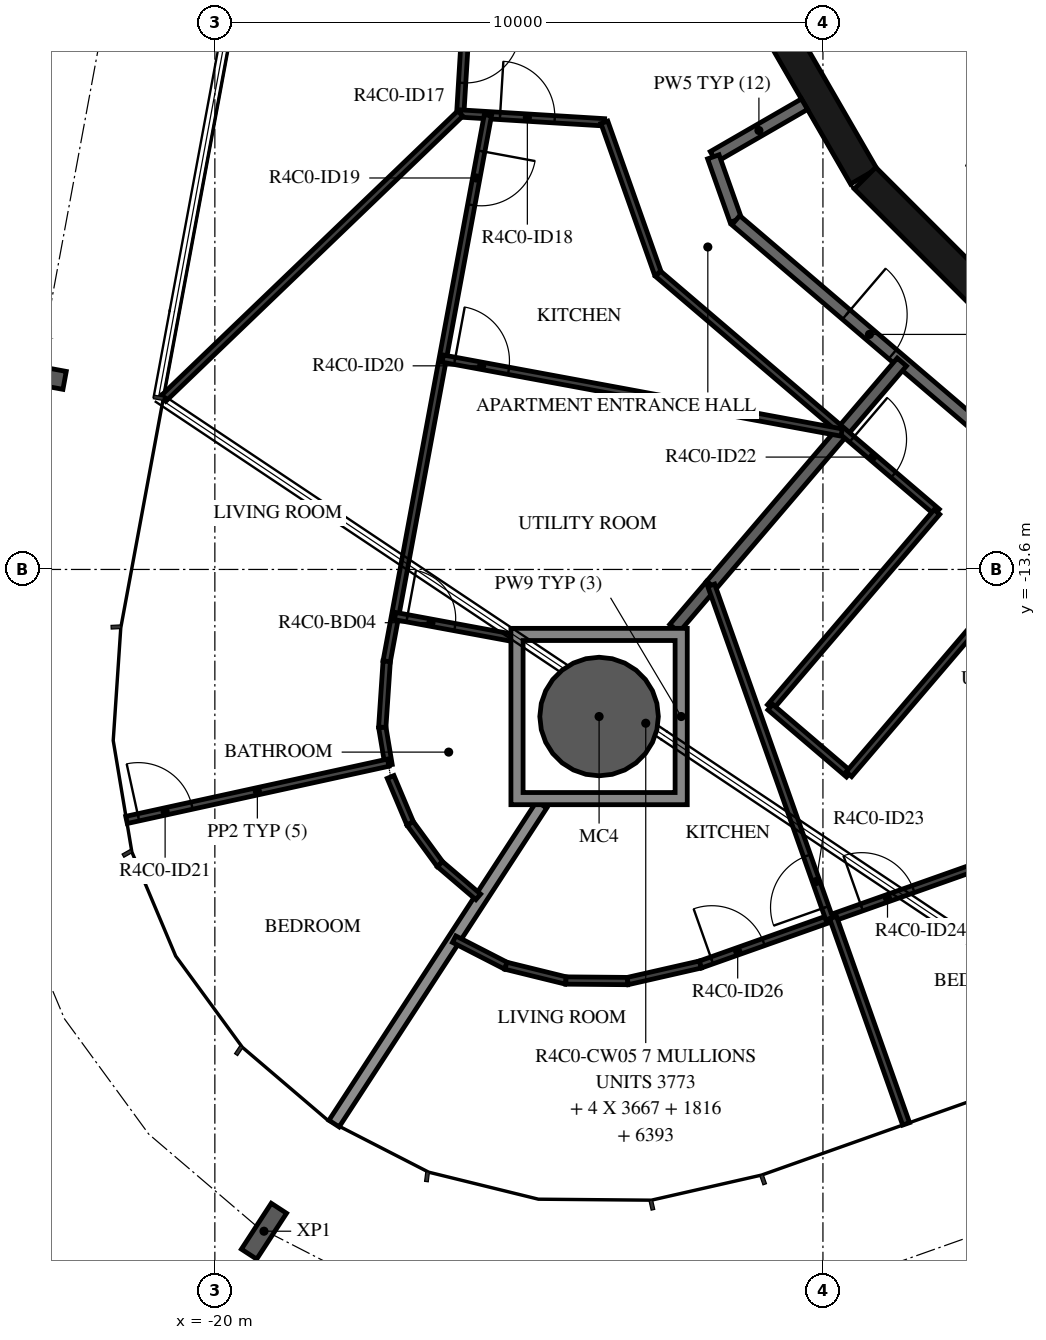
"""IFC4 building model, lengths in metres.
Left out: names, types, materials, properties, quantities, classifications, styles, units other than length and angle.
Written with IfcOpenShell. Run it as: python <this file> out.ifc"""

import sys

from ifc_helpers import new_model, si_unit, direction, frame, frame_2d, origin, origin_2d, place, context, subcontext, project, spatial, polyline, rectangle, hollow_circle, i_section, outline, extrude, element, fill, save


model = new_model("IFC4")
c1 = context("Model", 3, precision=1e-05, world=origin(), true_north=direction((0.0, 1.0)))
c2 = subcontext(c1, "Body", "Model", "MODEL_VIEW")
j1 = project(units=[si_unit("LENGTHUNIT", "METRE"), si_unit("PLANEANGLEUNIT", "RADIAN")], contexts=[c1])
p1 = place(None, origin())
s1 = spatial("IfcSite", under=j1, at=p1, CompositionType="ELEMENT")
p2 = place(p1, origin())
s2 = spatial("IfcBuilding", under=s1, at=p2, CompositionType="ELEMENT")
p3 = place(p2, frame((0.0, 0.0, 172.7)))
s3 = spatial("IfcBuildingStorey", under=s2, at=p3, CompositionType="ELEMENT", Elevation=172.7)
p4 = place(p3, frame((-13.681, -16.019, -0.38), z_axis=(0.0, 0.0, 1.0), x_axis=(1.0, 0.0, 0.0)))
e1 = element("IfcColumn", 1, at=p4, inside=s3, PredefinedType="COLUMN", context=c2, shape_type="SweptSolid", body=[
    extrude(hollow_circle(Radius=0.975, WallThickness=0.045, at=origin_2d()), origin(), (0.0, 0.0, 1.0), 3.5),
])
for number, where, z_axis, x_axis in (
    (2, (-22.914, -10.409, -0.38), (0.0, 0.0, 1.0), (0.182, 0.983, 0.0)),
    (3, (-19.192, -24.483, -0.38), (0.0, 0.0, 1.0), (-0.838, 0.546, 0.0)),
):
    element("IfcColumn", number, at=place(p3, frame(where, z_axis=z_axis, x_axis=x_axis)), inside=s3, PredefinedType="COLUMN", context=c2, shape_type="SweptSolid", body=[
        extrude(i_section(OverallWidth=0.3, OverallDepth=0.9, WebThickness=0.019, FlangeThickness=0.035, FilletRadius=0.03, at=origin_2d()), origin(), (0.0, 0.0, 1.0), 3.5),
    ])
p5 = place(p3, frame((-10.845, -4.51, 0.0), z_axis=(0.0, 0.0, 1.0), x_axis=(0.500087131594, -0.865975092491, 0.0)))
e4 = element("IfcWall", 4, at=p5, inside=s3, PredefinedType="SHEAR", context=c2, shape_type="SweptSolid", body=[
    extrude(rectangle(XDim=3.033, YDim=0.5, at=frame_2d((1.516, 0.0))), origin(), (0.0, 0.0, 1.0), 3.12),
])
p6 = place(p3, frame((-9.308, -7.164, 0.0), z_axis=(0.0, 0.0, 1.0), x_axis=(0.707106781187, -0.707106781187, 0.0)))
e5 = element("IfcWall", 5, at=p6, inside=s3, PredefinedType="SHEAR", context=c2, shape_type="SweptSolid", body=[
    extrude(rectangle(XDim=3.032, YDim=0.5, at=frame_2d((1.516, 0.0))), origin(), (0.0, 0.0, 1.0), 3.12),
])
p7 = place(p3, frame((-10.303, -5.949, 0.0), z_axis=(0.0, 0.0, 1.0), x_axis=(-0.866021168401, -0.500007335828, 0.0)))
e6 = element("IfcWall", 6, at=p7, inside=s3, PredefinedType="STANDARD", context=c2, shape_type="SweptSolid", body=[
    extrude(rectangle(XDim=1.731, YDim=0.2, at=frame_2d((0.865, 0.0))), origin(), (0.0, 0.0, 1.0), 3.12),
])
p8 = place(p3, frame((-11.802, -6.814, 0.0), z_axis=(0.0, 0.0, 1.0), x_axis=(0.333904297771, -0.942606980629, 0.0)))
e7 = element("IfcWall", 7, at=p8, inside=s3, PredefinedType="STANDARD", context=c2, shape_type="SweptSolid", body=[
    extrude(rectangle(XDim=1.107, YDim=0.2, at=frame_2d((0.553, 0.0))), origin(), (0.0, 0.0, 1.0), 3.12),
])
p9 = place(p3, frame((-11.433, -7.858, 0.0), z_axis=(0.0, 0.0, 1.0), x_axis=(0.760412154545, -0.649440801937, 0.0)))
e8 = element("IfcWall", 8, at=p9, inside=s3, PredefinedType="STANDARD", context=c2, shape_type="SweptSolid", body=[
    extrude(rectangle(XDim=7.181, YDim=0.2, at=frame_2d((3.59, 0.0))), origin(), (0.0, 0.0, 1.0), 3.12),
])
p10 = place(p9, frame((2.39, 0.0, 0.0)))
e9 = element("IfcOpeningElement", 9, at=p10, cuts=e8, PredefinedType="OPENING", context=c2, shape_type="SweptSolid", body=[
    extrude(rectangle(XDim=1.0, YDim=2.1, at=frame_2d((0.5, 1.05))), frame((0.0, 0.11, 0.0), z_axis=(0.0, -1.0, 0.0), x_axis=(1.0, 0.0, 0.0)), (0.0, 0.0, 1.0), 0.22),
])
p11 = place(p3, frame((-11.838, -13.86, 0.0), z_axis=(0.0, 0.0, 1.0), x_axis=(0.64944503311, 0.760408540831, 0.0)))
e10 = element("IfcWall", 10, at=p11, inside=s3, PredefinedType="STANDARD", context=c2, shape_type="SweptSolid", body=[
    extrude(rectangle(XDim=4.827, YDim=0.2, at=frame_2d((2.414, 0.0))), origin(), (0.0, 0.0, 1.0), 3.12),
])
p12 = place(p3, frame((-12.443, -14.569, 0.0), z_axis=(0.0, 0.0, 1.0), x_axis=(0.649517408851, 0.760346720648, 0.0)))
e11 = element("IfcWall", 11, at=p12, inside=s3, PredefinedType="STANDARD", context=c2, shape_type="SweptSolid", body=[
    extrude(rectangle(XDim=0.932, YDim=0.2, at=frame_2d((0.466, 0.0))), origin(), (0.0, 0.0, 1.0), 3.12),
])
p13 = place(p3, frame((-18.04, -22.713, 0.0), z_axis=(0.0, 0.0, 1.0), x_axis=(0.545628572271, 0.838027124335, 0.0)))
e12 = element("IfcWall", 12, at=p13, inside=s3, PredefinedType="STANDARD", context=c2, shape_type="SweptSolid", body=[
    extrude(rectangle(XDim=6.258, YDim=0.2, at=frame_2d((3.129, 0.0))), origin(), (0.0, 0.0, 1.0), 2.73),
])
p14 = place(p3, frame((-15.866, -4.5, 0.0), z_axis=(0.0, 0.0, 1.0), x_axis=(-0.060986374837, -0.998138598635, 0.0)))
e13 = element("IfcWall", 13, at=p14, inside=s3, PredefinedType="PARTITIONING", context=c2, shape_type="SweptSolid", body=[
    extrude(rectangle(XDim=1.605, YDim=0.12, at=frame_2d((0.803, 0.0))), origin(), (0.0, 0.0, 1.0), 3.12),
])
p15 = place(p14, frame((0.2, 0.0, 0.0)))
e14 = element("IfcOpeningElement", 14, at=p15, cuts=e13, PredefinedType="OPENING", context=c2, shape_type="SweptSolid", body=[
    extrude(rectangle(XDim=0.9, YDim=2.1, at=frame_2d((0.45, 1.05))), frame((0.0, 0.07, 0.0), z_axis=(0.0, -1.0, 0.0), x_axis=(1.0, 0.0, 0.0)), (0.0, 0.0, 1.0), 0.14),
])
p16 = place(p3, frame((-15.964, -6.102, 0.0), z_axis=(0.0, 0.0, 1.0), x_axis=(0.998145469708, -0.060873814574, 0.0)))
e15 = element("IfcWall", 15, at=p16, inside=s3, PredefinedType="PARTITIONING", context=c2, shape_type="SweptSolid", body=[
    extrude(rectangle(XDim=2.374, YDim=0.12, at=frame_2d((1.187, 0.0))), origin(), (0.0, 0.0, 1.0), 3.12),
])
p17 = place(p16, frame((0.656, 0.0, 0.0)))
e16 = element("IfcOpeningElement", 16, at=p17, cuts=e15, PredefinedType="OPENING", context=c2, shape_type="SweptSolid", body=[
    extrude(rectangle(XDim=0.9, YDim=2.1, at=frame_2d((0.45, 1.05))), frame((0.0, 0.07, 0.0), z_axis=(0.0, -1.0, 0.0), x_axis=(1.0, 0.0, 0.0)), (0.0, 0.0, 1.0), 0.14),
])
p18 = place(p3, frame((-13.594, -6.247, 0.0), z_axis=(0.0, 0.0, 1.0), x_axis=(0.333777006894, -0.942652061828, 0.0)))
e17 = element("IfcWall", 17, at=p18, inside=s3, PredefinedType="PARTITIONING", context=c2, shape_type="SweptSolid", body=[
    extrude(rectangle(XDim=2.642, YDim=0.12, at=frame_2d((1.321, 0.0))), origin(), (0.0, 0.0, 1.0), 3.12),
])
p19 = place(p3, frame((-12.713, -8.737, 0.0), z_axis=(0.0, 0.0, 1.0), x_axis=(0.760432387723, -0.649417110725, 0.0)))
e18 = element("IfcWall", 18, at=p19, inside=s3, PredefinedType="PARTITIONING", context=c2, shape_type="SweptSolid", body=[
    extrude(rectangle(XDim=6.032, YDim=0.12, at=frame_2d((3.016, 0.0))), origin(), (0.0, 0.0, 1.0), 3.12),
])
p20 = place(p19, frame((4.192, 0.0, 0.0)))
e19 = element("IfcOpeningElement", 19, at=p20, cuts=e18, PredefinedType="OPENING", context=c2, shape_type="SweptSolid", body=[
    extrude(rectangle(XDim=0.9, YDim=2.1, at=frame_2d((0.45, 1.05))), frame((0.0, 0.07, 0.0), z_axis=(0.0, -1.0, 0.0), x_axis=(1.0, 0.0, 0.0)), (0.0, 0.0, 1.0), 0.14),
])
p21 = place(p3, frame((-20.849, -10.792, 0.0), z_axis=(0.0, 0.0, 1.0), x_axis=(0.721364983662, 0.692555095531, 0.0)))
e20 = element("IfcWall", 20, at=p21, inside=s3, PredefinedType="PARTITIONING", context=c2, shape_type="SweptSolid", body=[
    extrude(rectangle(XDim=6.771, YDim=0.12, at=frame_2d((3.385, 0.0))), origin(), (0.0, 0.0, 1.0), 3.12),
])
p22 = place(p3, frame((-15.51, -6.13, 0.0), z_axis=(0.0, 0.0, 1.0), x_axis=(-0.182243361628, -0.98325345519, 0.0)))
e21 = element("IfcWall", 21, at=p22, inside=s3, PredefinedType="PARTITIONING", context=c2, shape_type="SweptSolid", body=[
    extrude(rectangle(XDim=9.134, YDim=0.12, at=frame_2d((4.567, 0.0))), origin(), (0.0, 0.0, 1.0), 3.12),
])
p23 = place(p22, frame((0.6, 0.0, 0.0)))
e22 = element("IfcOpeningElement", 22, at=p23, cuts=e21, PredefinedType="OPENING", context=c2, shape_type="SweptSolid", body=[
    extrude(rectangle(XDim=0.9, YDim=2.1, at=frame_2d((0.45, 1.05))), frame((0.0, 0.07, 0.0), z_axis=(0.0, -1.0, 0.0), x_axis=(1.0, 0.0, 0.0)), (0.0, 0.0, 1.0), 0.14),
])
p24 = place(p3, frame((-16.252, -10.133, 0.0), z_axis=(0.0, 0.0, 1.0), x_axis=(0.983256998026, -0.182224246005, 0.0)))
e23 = element("IfcWall", 23, at=p24, inside=s3, PredefinedType="PARTITIONING", context=c2, shape_type="SweptSolid", body=[
    extrude(rectangle(XDim=6.671, YDim=0.12, at=frame_2d((3.335, 0.0))), origin(), (0.0, 0.0, 1.0), 3.12),
])
p25 = place(p24, frame((0.2, 0.0, 0.0)))
e24 = element("IfcOpeningElement", 24, at=p25, cuts=e23, PredefinedType="OPENING", context=c2, shape_type="SweptSolid", body=[
    extrude(rectangle(XDim=0.9, YDim=2.1, at=frame_2d((0.45, 1.05))), frame((0.0, 0.07, 0.0), z_axis=(0.0, -1.0, 0.0), x_axis=(1.0, 0.0, 0.0)), (0.0, 0.0, 1.0), 0.14),
])
p26 = place(p3, frame((-17.143, -16.817, 0.0), z_axis=(0.0, 0.0, 1.0), x_axis=(-0.164964120994, 0.98629956848, 0.0)))
e25 = element("IfcWall", 25, at=p26, inside=s3, PredefinedType="PARTITIONING", context=c2, shape_type="SweptSolid", body=[
    extrude(rectangle(XDim=0.63, YDim=0.12, at=frame_2d((0.315, 0.0))), origin(), (0.0, 0.0, 1.0), 3.12),
])
p27 = place(p3, frame((-17.247, -16.195, 0.0), z_axis=(0.0, 0.0, 1.0), x_axis=(0.066712820538, 0.997772218282, 0.0)))
e26 = element("IfcWall", 26, at=p27, inside=s3, PredefinedType="PARTITIONING", context=c2, shape_type="SweptSolid", body=[
    extrude(rectangle(XDim=1.087, YDim=0.12, at=frame_2d((0.543, 0.0))), origin(), (0.0, 0.0, 1.0), 3.12),
])
p28 = place(p3, frame((-21.453, -17.719, 0.0), z_axis=(0.0, 0.0, 1.0), x_axis=(0.976887361549, 0.213754725903, 0.0)))
e27 = element("IfcWall", 27, at=p28, inside=s3, PredefinedType="PARTITIONING", context=c2, shape_type="SweptSolid", body=[
    extrude(rectangle(XDim=4.405, YDim=0.12, at=frame_2d((2.203, 0.0))), origin(), (0.0, 0.0, 1.0), 2.73),
])
p29 = place(p28, frame((0.2, 0.0, 0.0)))
e28 = element("IfcOpeningElement", 28, at=p29, cuts=e27, PredefinedType="OPENING", context=c2, shape_type="SweptSolid", body=[
    extrude(rectangle(XDim=0.9, YDim=2.1, at=frame_2d((0.45, 1.05))), frame((0.0, 0.07, 0.0), z_axis=(0.0, -1.0, 0.0), x_axis=(1.0, 0.0, 0.0)), (0.0, 0.0, 1.0), 0.14),
])
p30 = place(p3, frame((-17.036, -14.366, 0.0), z_axis=(0.0, 0.0, 1.0), x_axis=(0.983259435886, -0.182211091156, 0.0)))
e29 = element("IfcWall", 29, at=p30, inside=s3, PredefinedType="PARTITIONING", context=c2, shape_type="SweptSolid", body=[
    extrude(rectangle(XDim=1.938, YDim=0.12, at=frame_2d((0.969, 0.0))), origin(), (0.0, 0.0, 1.0), 3.12),
])
p31 = place(p30, frame((0.2, 0.0, 0.0)))
e30 = element("IfcOpeningElement", 30, at=p31, cuts=e29, PredefinedType="OPENING", context=c2, shape_type="SweptSolid", body=[
    extrude(rectangle(XDim=0.8, YDim=2.1, at=frame_2d((0.4, 1.05))), frame((0.0, 0.07, 0.0), z_axis=(0.0, -1.0, 0.0), x_axis=(1.0, 0.0, 0.0)), (0.0, 0.0, 1.0), 0.14),
])
for number, where, z_axis, x_axis in (
    (31, (-17.11, -17.013, 0.0), (0.0, 0.0, 1.0), (0.388, -0.922, 0.0)),
    (32, (-16.788, -17.777, 0.0), (0.0, 0.0, 1.0), (0.59, -0.807, 0.0)),
    (33, (-16.299, -18.446, 0.0), (0.0, 0.0, 1.0), (0.76, -0.649, 0.0)),
):
    element("IfcWall", number, at=place(p3, frame(where, z_axis=z_axis, x_axis=x_axis)), inside=s3, PredefinedType="PARTITIONING", context=c2, shape_type="SweptSolid", body=[
        extrude(rectangle(XDim=0.829, YDim=0.12, at=frame_2d((0.415, 0.0))), origin(), (0.0, 0.0, 1.0), 3.12),
    ])
p32 = place(p3, frame((-8.125, -12.655, 0.0), z_axis=(0.0, 0.0, 1.0), x_axis=(-0.649441944702, -0.760411178549, 0.0)))
e34 = element("IfcWall", 34, at=p32, inside=s3, PredefinedType="PARTITIONING", context=c2, shape_type="SweptSolid", body=[
    extrude(rectangle(XDim=4.22, YDim=0.12, at=frame_2d((2.11, 0.0))), origin(), (0.0, 0.0, 1.0), 3.12),
])
p33 = place(p3, frame((-10.866, -15.864, 0.0), z_axis=(0.0, 0.0, 1.0), x_axis=(0.760431300628, -0.649418383652, 0.0)))
e35 = element("IfcWall", 35, at=p33, inside=s3, PredefinedType="PARTITIONING", context=c2, shape_type="SweptSolid", body=[
    extrude(rectangle(XDim=1.7, YDim=0.12, at=frame_2d((0.85, 0.0))), origin(), (0.0, 0.0, 1.0), 3.12),
])
p34 = place(p3, frame((-9.573, -16.968, 0.0), z_axis=(0.0, 0.0, 1.0), x_axis=(0.649437062208, 0.760415348498, 0.0)))
e36 = element("IfcWall", 36, at=p34, inside=s3, PredefinedType="PARTITIONING", context=c2, shape_type="SweptSolid", body=[
    extrude(rectangle(XDim=4.219, YDim=0.12, at=frame_2d((2.11, 0.0))), origin(), (0.0, 0.0, 1.0), 3.12),
])
p35 = place(p3, frame((-16.065, -19.68, 0.0), z_axis=(0.0, 0.0, 1.0), x_axis=(0.889684645268, -0.456575549033, 0.0)))
e37 = element("IfcWall", 37, at=p35, inside=s3, PredefinedType="PARTITIONING", context=c2, shape_type="SweptSolid", body=[
    extrude(rectangle(XDim=0.957, YDim=0.12, at=frame_2d((0.479, 0.0))), origin(), (0.0, 0.0, 1.0), 3.12),
])
p36 = place(p3, frame((-15.214, -20.117, 0.0), z_axis=(0.0, 0.0, 1.0), x_axis=(0.970998575146, -0.239085271534, 0.0)))
e38 = element("IfcWall", 38, at=p36, inside=s3, PredefinedType="PARTITIONING", context=c2, shape_type="SweptSolid", body=[
    extrude(rectangle(XDim=1.016, YDim=0.12, at=frame_2d((0.508, 0.0))), origin(), (0.0, 0.0, 1.0), 3.12),
])
p37 = place(p3, frame((-14.227, -20.36, 0.0), z_axis=(0.0, 0.0, 1.0), x_axis=(0.999960467683, -0.008891741722, 0.0)))
e39 = element("IfcWall", 39, at=p37, inside=s3, PredefinedType="PARTITIONING", context=c2, shape_type="SweptSolid", body=[
    extrude(rectangle(XDim=1.016, YDim=0.12, at=frame_2d((0.508, 0.0))), origin(), (0.0, 0.0, 1.0), 3.12),
])
p38 = place(p3, frame((-13.211, -20.369, 0.0), z_axis=(0.0, 0.0, 1.0), x_axis=(0.974997834831, 0.222214360642, 0.0)))
e40 = element("IfcWall", 40, at=p38, inside=s3, PredefinedType="PARTITIONING", context=c2, shape_type="SweptSolid", body=[
    extrude(rectangle(XDim=1.227, YDim=0.12, at=frame_2d((0.614, 0.0))), origin(), (0.0, 0.0, 1.0), 3.12),
])
p39 = place(p3, frame((-12.015, -20.096, 0.0), z_axis=(0.0, 0.0, 1.0), x_axis=(0.942638913957, 0.33381413675, 0.0)))
e41 = element("IfcWall", 41, at=p39, inside=s3, PredefinedType="PARTITIONING", context=c2, shape_type="SweptSolid", body=[
    extrude(rectangle(XDim=14.104, YDim=0.12, at=frame_2d((7.052, 0.0))), origin(), (0.0, 0.0, 1.0), 3.12),
])
p40 = place(p39, frame((2.814, 0.0, 0.0)))
e42 = element("IfcOpeningElement", 42, at=p40, cuts=e41, PredefinedType="OPENING", context=c2, shape_type="SweptSolid", body=[
    extrude(rectangle(XDim=0.9, YDim=2.1, at=frame_2d((0.45, 1.05))), frame((0.0, 0.07, 0.0), z_axis=(0.0, -1.0, 0.0), x_axis=(1.0, 0.0, 0.0)), (0.0, 0.0, 1.0), 0.14),
])
p41 = place(p39, frame((6.444, 0.0, 0.0)))
e43 = element("IfcOpeningElement", 43, at=p41, cuts=e41, PredefinedType="OPENING", context=c2, shape_type="SweptSolid", body=[
    extrude(rectangle(XDim=0.9, YDim=2.1, at=frame_2d((0.45, 1.05))), frame((0.0, 0.07, 0.0), z_axis=(0.0, -1.0, 0.0), x_axis=(1.0, 0.0, 0.0)), (0.0, 0.0, 1.0), 0.14),
])
p42 = place(p39, frame((0.2, 0.0, 0.0)))
e44 = element("IfcOpeningElement", 44, at=p42, cuts=e41, PredefinedType="OPENING", context=c2, shape_type="SweptSolid", body=[
    extrude(rectangle(XDim=0.9, YDim=2.1, at=frame_2d((0.45, 1.05))), frame((0.0, 0.07, 0.0), z_axis=(0.0, -1.0, 0.0), x_axis=(1.0, 0.0, 0.0)), (0.0, 0.0, 1.0), 0.14),
])
p43 = place(p3, frame((-9.895, -19.346, 0.0), z_axis=(0.0, 0.0, 1.0), x_axis=(-0.333781129158, 0.942650602195, 0.0)))
e45 = element("IfcWall", 45, at=p43, inside=s3, PredefinedType="PARTITIONING", context=c2, shape_type="SweptSolid", body=[
    extrude(rectangle(XDim=5.819, YDim=0.12, at=frame_2d((2.91, 0.0))), origin(), (0.0, 0.0, 1.0), 3.12),
])
p44 = place(p43, frame((0.2, 0.0, 0.0)))
e46 = element("IfcOpeningElement", 46, at=p44, cuts=e45, PredefinedType="OPENING", context=c2, shape_type="SweptSolid", body=[
    extrude(rectangle(XDim=0.9, YDim=2.1, at=frame_2d((0.45, 1.05))), frame((0.0, 0.07, 0.0), z_axis=(0.0, -1.0, 0.0), x_axis=(1.0, 0.0, 0.0)), (0.0, 0.0, 1.0), 0.14),
])
p45 = place(p3, frame((-8.632, -22.718, 0.0), z_axis=(0.0, 0.0, 1.0), x_axis=(-0.333791905243, 0.942646786445, 0.0)))
e47 = element("IfcWall", 47, at=p45, inside=s3, PredefinedType="PARTITIONING", context=c2, shape_type="SweptSolid", body=[
    extrude(rectangle(XDim=3.6, YDim=0.12, at=frame_2d((1.8, 0.0))), origin(), (0.0, 0.0, 1.0), 3.12),
])
p46 = place(p3, origin())
e48 = element("IfcWall", 48, at=p46, inside=s3, PredefinedType="STANDARD", context=c2, shape_type="SweptSolid", body=[
    extrude(outline(polyline([(-12.231, -14.569), (-12.231, -17.469), (-15.131, -17.469), (-15.131, -14.569), (-12.231, -14.569)]), holes=[polyline([(-14.931, -17.269), (-12.431, -17.269), (-12.431, -14.769), (-14.931, -14.769), (-14.931, -17.269)])]), origin(), (0.0, 0.0, 1.0), 3.12),
])
p47 = place(p10, origin())
e49 = element("IfcDoor", 49, at=p47, inside=s3, OperationType="SINGLE_SWING_RIGHT", PredefinedType="DOOR", context=c2, shape_type="SweptSolid", body=[
    extrude(rectangle(XDim=1.0, YDim=2.1, at=frame_2d((0.5, 1.05))), frame((0.0, 0.025, 0.0), z_axis=(0.0, -1.0, 0.0), x_axis=(1.0, 0.0, 0.0)), (0.0, 0.0, 1.0), 0.05),
])
fill(e9, e49)
p48 = place(p15, origin())
e50 = element("IfcDoor", 50, at=p48, inside=s3, OperationType="SINGLE_SWING_RIGHT", PredefinedType="DOOR", context=c2, shape_type="SweptSolid", body=[
    extrude(rectangle(XDim=0.9, YDim=2.1, at=frame_2d((0.45, 1.05))), frame((0.0, 0.025, 0.0), z_axis=(0.0, -1.0, 0.0), x_axis=(1.0, 0.0, 0.0)), (0.0, 0.0, 1.0), 0.05),
])
fill(e14, e50)
p49 = place(p17, origin())
e51 = element("IfcDoor", 51, at=p49, inside=s3, OperationType="SINGLE_SWING_RIGHT", PredefinedType="DOOR", context=c2, shape_type="SweptSolid", body=[
    extrude(rectangle(XDim=0.9, YDim=2.1, at=frame_2d((0.45, 1.05))), frame((0.0, 0.025, 0.0), z_axis=(0.0, -1.0, 0.0), x_axis=(1.0, 0.0, 0.0)), (0.0, 0.0, 1.0), 0.05),
])
fill(e16, e51)
p50 = place(p23, origin())
e52 = element("IfcDoor", 52, at=p50, inside=s3, OperationType="SINGLE_SWING_RIGHT", PredefinedType="DOOR", context=c2, shape_type="SweptSolid", body=[
    extrude(rectangle(XDim=0.9, YDim=2.1, at=frame_2d((0.45, 1.05))), frame((0.0, 0.025, 0.0), z_axis=(0.0, -1.0, 0.0), x_axis=(1.0, 0.0, 0.0)), (0.0, 0.0, 1.0), 0.05),
])
fill(e22, e52)
p51 = place(p25, origin())
e53 = element("IfcDoor", 53, at=p51, inside=s3, OperationType="SINGLE_SWING_RIGHT", PredefinedType="DOOR", context=c2, shape_type="SweptSolid", body=[
    extrude(rectangle(XDim=0.9, YDim=2.1, at=frame_2d((0.45, 1.05))), frame((0.0, 0.025, 0.0), z_axis=(0.0, -1.0, 0.0), x_axis=(1.0, 0.0, 0.0)), (0.0, 0.0, 1.0), 0.05),
])
fill(e24, e53)
p52 = place(p31, origin())
e54 = element("IfcDoor", 54, at=p52, inside=s3, OperationType="SINGLE_SWING_RIGHT", PredefinedType="DOOR", context=c2, shape_type="SweptSolid", body=[
    extrude(rectangle(XDim=0.8, YDim=2.1, at=frame_2d((0.4, 1.05))), frame((0.0, 0.025, 0.0), z_axis=(0.0, -1.0, 0.0), x_axis=(1.0, 0.0, 0.0)), (0.0, 0.0, 1.0), 0.05),
])
fill(e30, e54)
p53 = place(p29, origin())
e55 = element("IfcDoor", 55, at=p53, inside=s3, OperationType="SINGLE_SWING_RIGHT", PredefinedType="DOOR", context=c2, shape_type="SweptSolid", body=[
    extrude(rectangle(XDim=0.9, YDim=2.1, at=frame_2d((0.45, 1.05))), frame((0.0, 0.025, 0.0), z_axis=(0.0, -1.0, 0.0), x_axis=(1.0, 0.0, 0.0)), (0.0, 0.0, 1.0), 0.05),
])
fill(e28, e55)
p54 = place(p20, origin())
e56 = element("IfcDoor", 56, at=p54, inside=s3, OperationType="SINGLE_SWING_LEFT", PredefinedType="DOOR", context=c2, shape_type="SweptSolid", body=[
    extrude(rectangle(XDim=0.9, YDim=2.1, at=frame_2d((0.45, 1.05))), frame((0.0, 0.025, 0.0), z_axis=(0.0, -1.0, 0.0), x_axis=(1.0, 0.0, 0.0)), (0.0, 0.0, 1.0), 0.05),
])
fill(e19, e56)
p55 = place(p44, origin())
e57 = element("IfcDoor", 57, at=p55, inside=s3, OperationType="SINGLE_SWING_LEFT", PredefinedType="DOOR", context=c2, shape_type="SweptSolid", body=[
    extrude(rectangle(XDim=0.9, YDim=2.1, at=frame_2d((0.45, 1.05))), frame((0.0, 0.025, 0.0), z_axis=(0.0, -1.0, 0.0), x_axis=(1.0, 0.0, 0.0)), (0.0, 0.0, 1.0), 0.05),
])
fill(e46, e57)
p56 = place(p40, origin())
e58 = element("IfcDoor", 58, at=p56, inside=s3, OperationType="SINGLE_SWING_LEFT", PredefinedType="DOOR", context=c2, shape_type="SweptSolid", body=[
    extrude(rectangle(XDim=0.9, YDim=2.1, at=frame_2d((0.45, 1.05))), frame((0.0, 0.025, 0.0), z_axis=(0.0, -1.0, 0.0), x_axis=(1.0, 0.0, 0.0)), (0.0, 0.0, 1.0), 0.05),
])
fill(e42, e58)
p57 = place(p42, origin())
e59 = element("IfcDoor", 59, at=p57, inside=s3, OperationType="SINGLE_SWING_RIGHT", PredefinedType="DOOR", context=c2, shape_type="SweptSolid", body=[
    extrude(rectangle(XDim=0.9, YDim=2.1, at=frame_2d((0.45, 1.05))), frame((0.0, 0.025, 0.0), z_axis=(0.0, -1.0, 0.0), x_axis=(1.0, 0.0, 0.0)), (0.0, 0.0, 1.0), 0.05),
])
fill(e44, e59)
save(model, sys.argv[1])
